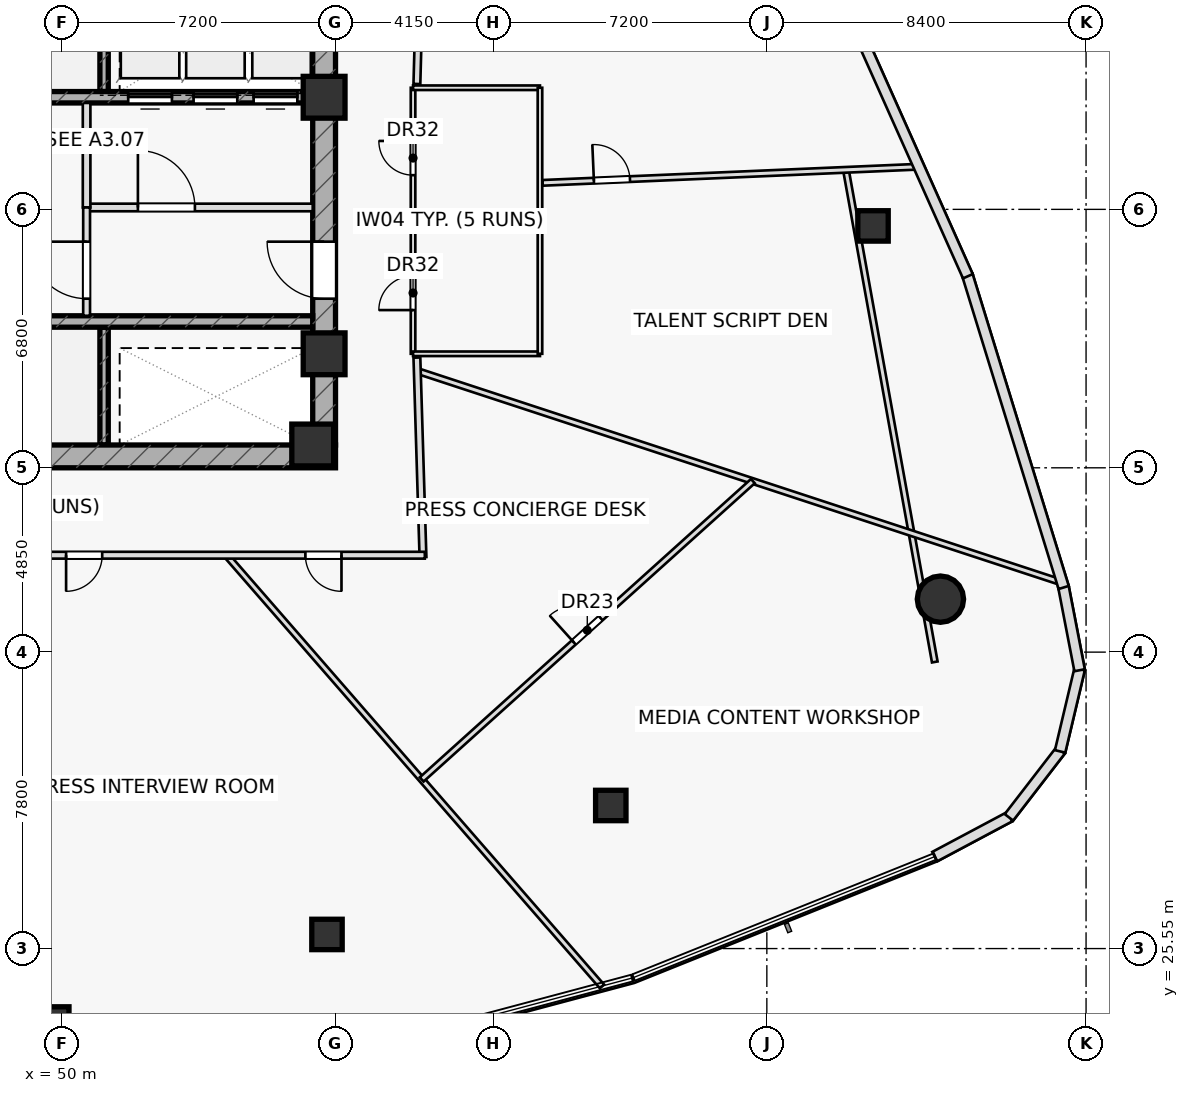
"""IFC4 building model, lengths in metres.
Left out: names, types, materials, properties, quantities, classifications, styles, units other than length and angle.
Written with IfcOpenShell. Run it as: python <this file> out.ifc"""

import sys

from ifc_helpers import new_model, si_unit, direction, frame, frame_2d, origin, origin_2d, place, context, subcontext, project, spatial, rectangle, hollow_rectangle, hollow_circle, extrude, element, fill, save


model = new_model("IFC4")
c1 = context("Model", 3, precision=1e-05, world=origin(), true_north=direction((0.0, 1.0)))
c2 = subcontext(c1, "Body", "Model", "MODEL_VIEW")
j1 = project(units=[si_unit("LENGTHUNIT", "METRE"), si_unit("PLANEANGLEUNIT", "RADIAN")], contexts=[c1])
p1 = place(None, origin())
s1 = spatial("IfcSite", under=j1, at=p1, CompositionType="ELEMENT")
p2 = place(p1, origin())
s2 = spatial("IfcBuilding", under=s1, at=p2, CompositionType="ELEMENT")
p3 = place(p2, frame((0.0, 0.0, 43.2)))
s3 = spatial("IfcBuildingStorey", under=s2, at=p3, CompositionType="ELEMENT", Elevation=43.2)
for number, where, z_axis, x_axis in (
    (1, (51.11, 48.1, 0.0), (0.0, 0.0, 1.0), (0.0, 1.0, 0.0)),
    (2, (51.11, 38.8, 0.0), (0.0, 0.0, 1.0), (0.0, 1.0, 0.0)),
):
    element("IfcWall", number, at=place(p3, frame(where, z_axis=z_axis, x_axis=x_axis)), inside=s3, PredefinedType="SHEAR", context=c2, shape_type="SweptSolid", body=[
        extrude(rectangle(XDim=3.1, YDim=0.22, at=frame_2d((1.55, 0.0))), origin(), (0.0, 0.0, 1.0), 3.6),
    ])
p4 = place(p3, frame((42.8, 38.5, 0.0), z_axis=(0.0, 0.0, 1.0), x_axis=(1.0, 0.0, 0.0)))
e3 = element("IfcWall", 3, at=p4, inside=s3, PredefinedType="SHEAR", context=c2, shape_type="SweptSolid", body=[
    extrude(rectangle(XDim=14.4, YDim=0.6, at=frame_2d((7.2, 0.0))), origin(), (0.0, 0.0, 1.0), 3.6),
])
p5 = place(p4, frame((0.88, 0.0, 0.0)))
e4 = element("IfcOpeningElement", 4, at=p5, cuts=e3, PredefinedType="OPENING", context=c2, shape_type="SweptSolid", body=[
    extrude(rectangle(XDim=1.05, YDim=2.2, at=frame_2d((0.525, 1.1))), frame((0.0, 0.31, 0.0), z_axis=(0.0, -1.0, 0.0), x_axis=(1.0, 0.0, 0.0)), (0.0, 0.0, 1.0), 0.62),
])
p6 = place(p3, frame((56.9, 38.8, 0.0), z_axis=(0.0, 0.0, 1.0), x_axis=(0.0, 1.0, 0.0)))
e5 = element("IfcWall", 5, at=p6, inside=s3, PredefinedType="SHEAR", context=c2, shape_type="SweptSolid", body=[
    extrude(rectangle(XDim=12.4, YDim=0.6, at=frame_2d((6.2, 0.0))), origin(), (0.0, 0.0, 1.0), 3.6),
])
p7 = place(p6, frame((3.85, 0.0, 0.0)))
e6 = element("IfcOpeningElement", 6, at=p7, cuts=e5, PredefinedType="OPENING", context=c2, shape_type="SweptSolid", body=[
    extrude(rectangle(XDim=1.5, YDim=2.2, at=frame_2d((0.75, 1.1))), frame((0.0, 0.31, 0.0), z_axis=(0.0, -1.0, 0.0), x_axis=(1.0, 0.0, 0.0)), (0.0, 0.0, 1.0), 0.62),
])
p8 = place(p3, frame((43.4, 47.95, 0.0), z_axis=(0.0, 0.0, 1.0), x_axis=(1.0, 0.0, 0.0)))
e7 = element("IfcWall", 7, at=p8, inside=s3, PredefinedType="SHEAR", context=c2, shape_type="SweptSolid", body=[
    extrude(rectangle(XDim=13.2, YDim=0.3, at=frame_2d((6.6, 0.0))), origin(), (0.0, 0.0, 1.0), 3.6),
])
p9 = place(p8, frame((8.345, 0.0, 0.0)))
e8 = element("IfcOpeningElement", 8, at=p9, cuts=e7, PredefinedType="OPENING", context=c2, shape_type="SweptSolid", body=[
    extrude(rectangle(XDim=1.15, YDim=2.2, at=frame_2d((0.575, 1.1))), frame((0.0, 0.16, 0.0), z_axis=(0.0, -1.0, 0.0), x_axis=(1.0, 0.0, 0.0)), (0.0, 0.0, 1.0), 0.32),
])
p10 = place(p8, frame((10.065, 0.0, 0.0)))
e9 = element("IfcOpeningElement", 9, at=p10, cuts=e7, PredefinedType="OPENING", context=c2, shape_type="SweptSolid", body=[
    extrude(rectangle(XDim=1.15, YDim=2.2, at=frame_2d((0.575, 1.1))), frame((0.0, 0.16, 0.0), z_axis=(0.0, -1.0, 0.0), x_axis=(1.0, 0.0, 0.0)), (0.0, 0.0, 1.0), 0.32),
])
p11 = place(p8, frame((11.645, 0.0, 0.0)))
e10 = element("IfcOpeningElement", 10, at=p11, cuts=e7, PredefinedType="OPENING", context=c2, shape_type="SweptSolid", body=[
    extrude(rectangle(XDim=1.15, YDim=2.2, at=frame_2d((0.575, 1.1))), frame((0.0, 0.16, 0.0), z_axis=(0.0, -1.0, 0.0), x_axis=(1.0, 0.0, 0.0)), (0.0, 0.0, 1.0), 0.32),
])
p12 = place(p3, frame((43.4, 42.05, 0.0), z_axis=(0.0, 0.0, 1.0), x_axis=(1.0, 0.0, 0.0)))
e11 = element("IfcWall", 11, at=p12, inside=s3, PredefinedType="SHEAR", context=c2, shape_type="SweptSolid", body=[
    extrude(rectangle(XDim=13.2, YDim=0.3, at=frame_2d((6.6, 0.0))), origin(), (0.0, 0.0, 1.0), 3.6),
])
for number, where, z_axis, x_axis in (
    (12, (56.9, 47.95, 0.0), (0.0, 0.0, 1.0), (1.0, 0.0, 0.0)),
    (13, (56.9, 41.2, 0.0), (0.0, 0.0, 1.0), (1.0, 0.0, 0.0)),
    (14, (56.6, 38.8, 0.0), (0.0, 0.0, 1.0), (1.0, 0.0, 0.0)),
):
    element("IfcColumn", number, at=place(p3, frame(where, z_axis=z_axis, x_axis=x_axis)), inside=s3, PredefinedType="COLUMN", context=c2, shape_type="SweptSolid", body=[
        extrude(rectangle(XDim=1.1, YDim=1.1, at=origin_2d()), origin(), (0.0, 0.0, 1.0), 3.6),
    ])
for number, where, z_axis, x_axis in (
    (15, (49.787, 23.618, 0.0), (0.0, 0.0, 1.0), (1.0, 0.0, 0.0)),
    (16, (56.975, 25.921, 0.0), (0.0, 0.0, 1.0), (1.0, 0.0, 0.0)),
    (17, (64.444, 29.315, 0.0), (0.0, 0.0, 1.0), (1.0, 0.0, 0.0)),
):
    element("IfcColumn", number, at=place(p3, frame(where, z_axis=z_axis, x_axis=x_axis)), inside=s3, PredefinedType="COLUMN", context=c2, shape_type="SweptSolid", body=[
        extrude(hollow_rectangle(XDim=0.8, YDim=0.8, WallThickness=0.045, at=origin_2d()), origin(), (0.0, 0.0, 1.0), 3.6),
    ])
p13 = place(p3, frame((73.118, 34.744, 0.0), z_axis=(0.0, 0.0, 1.0), x_axis=(1.0, 0.0, 0.0)))
e18 = element("IfcColumn", 18, at=p13, inside=s3, PredefinedType="COLUMN", context=c2, shape_type="SweptSolid", body=[
    extrude(hollow_circle(Radius=0.61, WallThickness=0.05, at=origin_2d()), origin(), (0.0, 0.0, 1.0), 3.6),
])
p14 = place(p3, frame((71.344, 44.565, 0.0), z_axis=(0.0, 0.0, 1.0), x_axis=(1.0, 0.0, 0.0)))
e19 = element("IfcColumn", 19, at=p14, inside=s3, PredefinedType="COLUMN", context=c2, shape_type="SweptSolid", body=[
    extrude(hollow_rectangle(XDim=0.8, YDim=0.8, WallThickness=0.045, at=origin_2d()), origin(), (0.0, 0.0, 1.0), 3.6),
])
p15 = place(p3, frame((50.65, 45.05, 0.0), z_axis=(0.0, 0.0, 1.0), x_axis=(1.0, 0.0, 0.0)))
e20 = element("IfcWall", 20, at=p15, inside=s3, PredefinedType="PARTITIONING", context=c2, shape_type="SweptSolid", body=[
    extrude(rectangle(XDim=5.95, YDim=0.2, at=frame_2d((2.975, 0.0))), origin(), (0.0, 0.0, 1.0), 3.6),
])
p16 = place(p15, frame((1.35, 0.0, 0.0)))
e21 = element("IfcOpeningElement", 21, at=p16, cuts=e20, PredefinedType="OPENING", context=c2, shape_type="SweptSolid", body=[
    extrude(rectangle(XDim=1.5, YDim=2.2, at=frame_2d((0.75, 1.1))), frame((0.0, 0.11, 0.0), z_axis=(0.0, -1.0, 0.0), x_axis=(1.0, 0.0, 0.0)), (0.0, 0.0, 1.0), 0.22),
])
p17 = place(p3, frame((50.65, 45.05, 0.0), z_axis=(0.0, 0.0, 1.0), x_axis=(0.0, 1.0, 0.0)))
e22 = element("IfcWall", 22, at=p17, inside=s3, PredefinedType="PARTITIONING", context=c2, shape_type="SweptSolid", body=[
    extrude(rectangle(XDim=2.75, YDim=0.2, at=frame_2d((1.375, 0.0))), origin(), (0.0, 0.0, 1.0), 3.6),
])
p18 = place(p3, frame((50.65, 42.2, 0.0), z_axis=(0.0, 0.0, 1.0), x_axis=(0.0, 1.0, 0.0)))
e23 = element("IfcWall", 23, at=p18, inside=s3, PredefinedType="PARTITIONING", context=c2, shape_type="SweptSolid", body=[
    extrude(rectangle(XDim=2.85, YDim=0.18, at=frame_2d((1.425, 0.0))), origin(), (0.0, 0.0, 1.0), 3.6),
])
p19 = place(p18, frame((0.45, 0.0, 0.0)))
e24 = element("IfcOpeningElement", 24, at=p19, cuts=e23, PredefinedType="OPENING", context=c2, shape_type="SweptSolid", body=[
    extrude(rectangle(XDim=1.5, YDim=2.2, at=frame_2d((0.75, 1.1))), frame((0.0, 0.1, 0.0), z_axis=(0.0, -1.0, 0.0), x_axis=(1.0, 0.0, 0.0)), (0.0, 0.0, 1.0), 0.2),
])
p20 = place(p3, frame((72.969, 33.091, 0.0), z_axis=(0.0, 0.0, 1.0), x_axis=(-0.177742578179, 0.984077017261, 0.0)))
e25 = element("IfcWall", 25, at=p20, inside=s3, PredefinedType="PARTITIONING", context=c2, shape_type="SweptSolid", body=[
    extrude(rectangle(XDim=13.179, YDim=0.15, at=frame_2d((6.59, 0.0))), origin(), (0.0, 0.0, 1.0), 2.925),
])
p21 = place(p3, frame((59.24, 41.2, 0.0), z_axis=(0.0, 0.0, 1.0), x_axis=(0.0, 1.0, 0.0)))
e26 = element("IfcWall", 26, at=p21, inside=s3, PredefinedType="PARTITIONING", context=c2, shape_type="SweptSolid", body=[
    extrude(rectangle(XDim=7.0, YDim=0.12, at=frame_2d((3.5, 0.0))), origin(), (0.0, 0.0, 1.0), 3.6),
])
p22 = place(p21, frame((1.15, 0.0, 0.0)))
e27 = element("IfcOpeningElement", 27, at=p22, cuts=e26, PredefinedType="OPENING", context=c2, shape_type="SweptSolid", body=[
    extrude(rectangle(XDim=0.9, YDim=2.05, at=frame_2d((0.45, 1.025))), frame((0.0, 0.07, 0.0), z_axis=(0.0, -1.0, 0.0), x_axis=(1.0, 0.0, 0.0)), (0.0, 0.0, 1.0), 0.14),
])
p23 = place(p21, frame((4.7, 0.0, 0.0)))
e28 = element("IfcOpeningElement", 28, at=p23, cuts=e26, PredefinedType="OPENING", context=c2, shape_type="SweptSolid", body=[
    extrude(rectangle(XDim=0.9, YDim=2.05, at=frame_2d((0.45, 1.025))), frame((0.0, 0.07, 0.0), z_axis=(0.0, -1.0, 0.0), x_axis=(1.0, 0.0, 0.0)), (0.0, 0.0, 1.0), 0.14),
])
p24 = place(p3, frame((59.24, 41.2, 0.0), z_axis=(0.0, 0.0, 1.0), x_axis=(1.0, 0.0, 0.0)))
e29 = element("IfcWall", 29, at=p24, inside=s3, PredefinedType="PARTITIONING", context=c2, shape_type="SweptSolid", body=[
    extrude(rectangle(XDim=3.34, YDim=0.12, at=frame_2d((1.67, 0.0))), origin(), (0.0, 0.0, 1.0), 2.925),
])
for number, where, z_axis, x_axis in (
    (30, (59.24, 44.65, 0.0), (0.0, 0.0, 1.0), (1.0, 0.0, 0.0)),
    (31, (59.24, 48.2, 0.0), (0.0, 0.0, 1.0), (1.0, 0.0, 0.0)),
):
    element("IfcWall", number, at=place(p3, frame(where, z_axis=z_axis, x_axis=x_axis)), inside=s3, PredefinedType="PARTITIONING", context=c2, shape_type="SweptSolid", body=[
        extrude(rectangle(XDim=3.34, YDim=0.12, at=frame_2d((1.67, 0.0))), origin(), (0.0, 0.0, 1.0), 3.6),
    ])
p25 = place(p3, frame((62.58, 41.2, 0.0), z_axis=(0.0, 0.0, 1.0), x_axis=(0.0, 1.0, 0.0)))
e32 = element("IfcWall", 32, at=p25, inside=s3, PredefinedType="PARTITIONING", context=c2, shape_type="SweptSolid", body=[
    extrude(rectangle(XDim=7.0, YDim=0.12, at=frame_2d((3.5, 0.0))), origin(), (0.0, 0.0, 1.0), 3.6),
])
p26 = place(p3, frame((54.327, 35.9, 0.0), z_axis=(0.0, 0.0, 1.0), x_axis=(0.656862876703, -0.754010053785, 0.0)))
e33 = element("IfcWall", 33, at=p26, inside=s3, PredefinedType="PARTITIONING", context=c2, shape_type="SweptSolid", body=[
    extrude(rectangle(XDim=15.048, YDim=0.15, at=frame_2d((7.524, 0.0))), origin(), (0.0, 0.0, 1.0), 2.925),
])
p27 = place(p3, frame((59.352, 40.748, 0.0), z_axis=(0.0, 0.0, 1.0), x_axis=(0.95011325809, -0.31190510865, 0.0)))
e34 = element("IfcWall", 34, at=p27, inside=s3, PredefinedType="PARTITIONING", context=c2, shape_type="SweptSolid", body=[
    extrude(rectangle(XDim=17.872, YDim=0.15, at=frame_2d((8.936, 0.0))), origin(), (0.0, 0.0, 1.0), 2.925),
])
p28 = place(p3, frame((62.65, 45.698, 0.0), z_axis=(0.0, 0.0, 1.0), x_axis=(0.999078725553, 0.042915034048, 0.0)))
e35 = element("IfcWall", 35, at=p28, inside=s3, PredefinedType="PARTITIONING", context=c2, shape_type="SweptSolid", body=[
    extrude(rectangle(XDim=9.921, YDim=0.15, at=frame_2d((4.961, 0.0))), origin(), (0.0, 0.0, 1.0), 2.975),
])
p29 = place(p28, frame((1.35, 0.0, 0.0)))
e36 = element("IfcOpeningElement", 36, at=p29, cuts=e35, PredefinedType="OPENING", context=c2, shape_type="SweptSolid", body=[
    extrude(rectangle(XDim=0.95, YDim=2.05, at=frame_2d((0.475, 1.025))), frame((0.0, 0.085, 0.0), z_axis=(0.0, -1.0, 0.0), x_axis=(1.0, 0.0, 0.0)), (0.0, 0.0, 1.0), 0.17),
])
p30 = place(p3, frame((59.467, 30.0, 0.0), z_axis=(0.0, 0.0, 1.0), x_axis=(0.743038445117, 0.669248734835, 0.0)))
e37 = element("IfcWall", 37, at=p30, inside=s3, PredefinedType="PARTITIONING", context=c2, shape_type="SweptSolid", body=[
    extrude(rectangle(XDim=11.729, YDim=0.15, at=frame_2d((5.865, 0.0))), origin(), (0.0, 0.0, 1.0), 2.925),
])
p31 = place(p30, frame((5.389, 0.0, 0.0)))
e38 = element("IfcOpeningElement", 38, at=p31, cuts=e37, PredefinedType="OPENING", context=c2, shape_type="SweptSolid", body=[
    extrude(rectangle(XDim=0.95, YDim=2.05, at=frame_2d((0.475, 1.025))), frame((0.0, 0.085, 0.0), z_axis=(0.0, -1.0, 0.0), x_axis=(1.0, 0.0, 0.0)), (0.0, 0.0, 1.0), 0.17),
])
p32 = place(p3, frame((59.501, 54.15, 0.0), z_axis=(0.0, 0.0, 1.0), x_axis=(-0.027367567602, -0.999625437973, 0.0)))
e39 = element("IfcWall", 39, at=p32, inside=s3, PredefinedType="PARTITIONING", context=c2, shape_type="SweptSolid", body=[
    extrude(rectangle(XDim=5.852, YDim=0.18, at=frame_2d((2.926, 0.0))), origin(), (0.0, 0.0, 1.0), 2.925),
])
p33 = place(p32, frame((2.451, 0.0, 0.0)))
e40 = element("IfcOpeningElement", 40, at=p33, cuts=e39, PredefinedType="OPENING", context=c2, shape_type="SweptSolid", body=[
    extrude(rectangle(XDim=0.95, YDim=2.05, at=frame_2d((0.475, 1.025))), frame((0.0, 0.1, 0.0), z_axis=(0.0, -1.0, 0.0), x_axis=(1.0, 0.0, 0.0)), (0.0, 0.0, 1.0), 0.2),
])
p34 = place(p3, frame((59.342, 41.1, 0.0), z_axis=(0.0, 0.0, 1.0), x_axis=(0.030445329425, -0.999536433511, 0.0)))
e41 = element("IfcWall", 41, at=p34, inside=s3, PredefinedType="PARTITIONING", context=c2, shape_type="SweptSolid", body=[
    extrude(rectangle(XDim=5.252, YDim=0.18, at=frame_2d((2.626, 0.0))), origin(), (0.0, 0.0, 1.0), 2.925),
])
p35 = place(p3, frame((59.55, 35.9, 0.0), z_axis=(0.0, 0.0, 1.0), x_axis=(-1.0, 0.0, 0.0)))
e42 = element("IfcWall", 42, at=p35, inside=s3, PredefinedType="PARTITIONING", context=c2, shape_type="SweptSolid", body=[
    extrude(rectangle(XDim=22.05, YDim=0.18, at=frame_2d((11.025, 0.0))), origin(), (0.0, 0.0, 1.0), 2.925),
])
p36 = place(p35, frame((2.193, 0.0, 0.0)))
e43 = element("IfcOpeningElement", 43, at=p36, cuts=e42, PredefinedType="OPENING", context=c2, shape_type="SweptSolid", body=[
    extrude(rectangle(XDim=0.95, YDim=2.05, at=frame_2d((0.475, 1.025))), frame((0.0, 0.1, 0.0), z_axis=(0.0, -1.0, 0.0), x_axis=(1.0, 0.0, 0.0)), (0.0, 0.0, 1.0), 0.2),
])
p37 = place(p35, frame((8.49, 0.0, 0.0)))
e44 = element("IfcOpeningElement", 44, at=p37, cuts=e42, PredefinedType="OPENING", context=c2, shape_type="SweptSolid", body=[
    extrude(rectangle(XDim=0.95, YDim=2.05, at=frame_2d((0.475, 1.025))), frame((0.0, 0.1, 0.0), z_axis=(0.0, -1.0, 0.0), x_axis=(1.0, 0.0, 0.0)), (0.0, 0.0, 1.0), 0.2),
])
p38 = place(p35, frame((14.76, 0.0, 0.0)))
e45 = element("IfcOpeningElement", 45, at=p38, cuts=e42, PredefinedType="OPENING", context=c2, shape_type="SweptSolid", body=[
    extrude(rectangle(XDim=0.95, YDim=2.05, at=frame_2d((0.475, 1.025))), frame((0.0, 0.1, 0.0), z_axis=(0.0, -1.0, 0.0), x_axis=(1.0, 0.0, 0.0)), (0.0, 0.0, 1.0), 0.2),
])
p39 = place(p35, frame((19.281, 0.0, 0.0)))
e46 = element("IfcOpeningElement", 46, at=p39, cuts=e42, PredefinedType="OPENING", context=c2, shape_type="SweptSolid", body=[
    extrude(rectangle(XDim=0.95, YDim=2.05, at=frame_2d((0.475, 1.025))), frame((0.0, 0.1, 0.0), z_axis=(0.0, -1.0, 0.0), x_axis=(1.0, 0.0, 0.0)), (0.0, 0.0, 1.0), 0.2),
])
p40 = place(p3, frame((72.969, 27.97, 0.0), z_axis=(0.0, 0.0, 1.0), x_axis=(0.882579473969, 0.470163239874, 0.0)))
e47 = element("IfcWall", 47, at=p40, inside=s3, PredefinedType="STANDARD", context=c2, shape_type="SweptSolid", body=[
    extrude(rectangle(XDim=2.237, YDim=0.28, at=frame_2d((1.118, 0.0))), origin(), (0.0, 0.0, 1.0), 3.6),
])
p41 = place(p3, frame((74.92, 29.003, 0.0), z_axis=(0.0, 0.0, 1.0), x_axis=(0.610829003642, 0.791762545407, 0.0)))
e48 = element("IfcWall", 48, at=p41, inside=s3, PredefinedType="STANDARD", context=c2, shape_type="SweptSolid", body=[
    extrude(rectangle(XDim=2.225, YDim=0.28, at=frame_2d((1.113, 0.0))), origin(), (0.0, 0.0, 1.0), 3.6),
])
p42 = place(p3, frame((76.267, 30.738, 0.0), z_axis=(0.0, 0.0, 1.0), x_axis=(0.230873771051, 0.972983710984, 0.0)))
e49 = element("IfcWall", 49, at=p42, inside=s3, PredefinedType="STANDARD", context=c2, shape_type="SweptSolid", body=[
    extrude(rectangle(XDim=2.225, YDim=0.28, at=frame_2d((1.112, 0.0))), origin(), (0.0, 0.0, 1.0), 3.6),
])
p43 = place(p3, frame((76.78, 32.874, 0.0), z_axis=(0.0, 0.0, 1.0), x_axis=(-0.189991507886, 0.981785733718, 0.0)))
e50 = element("IfcWall", 50, at=p43, inside=s3, PredefinedType="STANDARD", context=c2, shape_type="SweptSolid", body=[
    extrude(rectangle(XDim=2.248, YDim=0.28, at=frame_2d((1.124, 0.0))), origin(), (0.0, 0.0, 1.0), 3.6),
])
p44 = place(p3, frame((76.36, 35.051, 0.0), z_axis=(0.0, 0.0, 1.0), x_axis=(-0.29442303494, 0.955675194037, 0.0)))
e51 = element("IfcWall", 51, at=p44, inside=s3, PredefinedType="STANDARD", context=c2, shape_type="SweptSolid", body=[
    extrude(rectangle(XDim=8.598, YDim=0.28, at=frame_2d((4.299, 0.0))), origin(), (0.0, 0.0, 1.0), 3.6),
])
p45 = place(p3, frame((73.839, 43.24, 0.0), z_axis=(0.0, 0.0, 1.0), x_axis=(-0.407915855492, 0.91301952599, 0.0)))
e52 = element("IfcWall", 52, at=p45, inside=s3, PredefinedType="STANDARD", context=c2, shape_type="SweptSolid", body=[
    extrude(rectangle(XDim=8.586, YDim=0.28, at=frame_2d((4.293, 0.0))), origin(), (0.0, 0.0, 1.0), 3.6),
])
p46 = place(p7, origin())
e53 = element("IfcDoor", 53, at=p46, inside=s3, OperationType="SINGLE_SWING_RIGHT", PredefinedType="DOOR", context=c2, shape_type="SweptSolid", body=[
    extrude(rectangle(XDim=1.5, YDim=2.2, at=frame_2d((0.75, 1.1))), frame((0.0, 0.025, 0.0), z_axis=(0.0, -1.0, 0.0), x_axis=(1.0, 0.0, 0.0)), (0.0, 0.0, 1.0), 0.05),
])
fill(e6, e53)
p47 = place(p16, origin())
e54 = element("IfcDoor", 54, at=p47, inside=s3, OperationType="SINGLE_SWING_LEFT", PredefinedType="DOOR", context=c2, shape_type="SweptSolid", body=[
    extrude(rectangle(XDim=1.5, YDim=2.2, at=frame_2d((0.75, 1.1))), frame((0.0, 0.025, 0.0), z_axis=(0.0, -1.0, 0.0), x_axis=(1.0, 0.0, 0.0)), (0.0, 0.0, 1.0), 0.05),
])
fill(e21, e54)
p48 = place(p19, origin())
e55 = element("IfcDoor", 55, at=p48, inside=s3, OperationType="SINGLE_SWING_RIGHT", PredefinedType="DOOR", context=c2, shape_type="SweptSolid", body=[
    extrude(rectangle(XDim=1.5, YDim=2.2, at=frame_2d((0.75, 1.1))), frame((0.0, 0.025, 0.0), z_axis=(0.0, -1.0, 0.0), x_axis=(1.0, 0.0, 0.0)), (0.0, 0.0, 1.0), 0.05),
])
fill(e24, e55)
p49 = place(p22, origin())
e56 = element("IfcDoor", 56, at=p49, inside=s3, OperationType="SINGLE_SWING_LEFT", PredefinedType="DOOR", context=c2, shape_type="SweptSolid", body=[
    extrude(rectangle(XDim=0.9, YDim=2.05, at=frame_2d((0.45, 1.025))), frame((0.0, 0.025, 0.0), z_axis=(0.0, -1.0, 0.0), x_axis=(1.0, 0.0, 0.0)), (0.0, 0.0, 1.0), 0.05),
])
fill(e27, e56)
p50 = place(p23, origin())
e57 = element("IfcDoor", 57, at=p50, inside=s3, OperationType="SINGLE_SWING_RIGHT", PredefinedType="DOOR", context=c2, shape_type="SweptSolid", body=[
    extrude(rectangle(XDim=0.9, YDim=2.05, at=frame_2d((0.45, 1.025))), frame((0.0, 0.025, 0.0), z_axis=(0.0, -1.0, 0.0), x_axis=(1.0, 0.0, 0.0)), (0.0, 0.0, 1.0), 0.05),
])
fill(e28, e57)
p51 = place(p29, origin())
e58 = element("IfcDoor", 58, at=p51, inside=s3, OperationType="SINGLE_SWING_LEFT", PredefinedType="DOOR", context=c2, shape_type="SweptSolid", body=[
    extrude(rectangle(XDim=0.95, YDim=2.05, at=frame_2d((0.475, 1.025))), frame((0.0, 0.025, 0.0), z_axis=(0.0, -1.0, 0.0), x_axis=(1.0, 0.0, 0.0)), (0.0, 0.0, 1.0), 0.05),
])
fill(e36, e58)
p52 = place(p31, origin())
e59 = element("IfcDoor", 59, at=p52, inside=s3, OperationType="SINGLE_SWING_LEFT", PredefinedType="DOOR", context=c2, shape_type="SweptSolid", body=[
    extrude(rectangle(XDim=0.95, YDim=2.05, at=frame_2d((0.475, 1.025))), frame((0.0, 0.025, 0.0), z_axis=(0.0, -1.0, 0.0), x_axis=(1.0, 0.0, 0.0)), (0.0, 0.0, 1.0), 0.05),
])
fill(e38, e59)
p53 = place(p36, origin())
e60 = element("IfcDoor", 60, at=p53, inside=s3, OperationType="SINGLE_SWING_LEFT", PredefinedType="DOOR", context=c2, shape_type="SweptSolid", body=[
    extrude(rectangle(XDim=0.95, YDim=2.05, at=frame_2d((0.475, 1.025))), frame((0.0, 0.025, 0.0), z_axis=(0.0, -1.0, 0.0), x_axis=(1.0, 0.0, 0.0)), (0.0, 0.0, 1.0), 0.05),
])
fill(e43, e60)
p54 = place(p37, origin())
e61 = element("IfcDoor", 61, at=p54, inside=s3, OperationType="SINGLE_SWING_RIGHT", PredefinedType="DOOR", context=c2, shape_type="SweptSolid", body=[
    extrude(rectangle(XDim=0.95, YDim=2.05, at=frame_2d((0.475, 1.025))), frame((0.0, 0.025, 0.0), z_axis=(0.0, -1.0, 0.0), x_axis=(1.0, 0.0, 0.0)), (0.0, 0.0, 1.0), 0.05),
])
fill(e44, e61)
p55 = place(p9, origin())
e62 = element("IfcDoor", 62, at=p55, inside=s3, OperationType="SLIDING_TO_LEFT", PredefinedType="DOOR", context=c2, shape_type="SweptSolid", body=[
    extrude(rectangle(XDim=1.15, YDim=2.2, at=frame_2d((0.575, 1.1))), frame((0.0, 0.025, 0.0), z_axis=(0.0, -1.0, 0.0), x_axis=(1.0, 0.0, 0.0)), (0.0, 0.0, 1.0), 0.05),
])
fill(e8, e62)
p56 = place(p10, origin())
e63 = element("IfcDoor", 63, at=p56, inside=s3, OperationType="SLIDING_TO_LEFT", PredefinedType="DOOR", context=c2, shape_type="SweptSolid", body=[
    extrude(rectangle(XDim=1.15, YDim=2.2, at=frame_2d((0.575, 1.1))), frame((0.0, 0.025, 0.0), z_axis=(0.0, -1.0, 0.0), x_axis=(1.0, 0.0, 0.0)), (0.0, 0.0, 1.0), 0.05),
])
fill(e9, e63)
p57 = place(p11, origin())
e64 = element("IfcDoor", 64, at=p57, inside=s3, OperationType="SLIDING_TO_LEFT", PredefinedType="DOOR", context=c2, shape_type="SweptSolid", body=[
    extrude(rectangle(XDim=1.15, YDim=2.2, at=frame_2d((0.575, 1.1))), frame((0.0, 0.025, 0.0), z_axis=(0.0, -1.0, 0.0), x_axis=(1.0, 0.0, 0.0)), (0.0, 0.0, 1.0), 0.05),
])
fill(e10, e64)
save(model, sys.argv[1])
